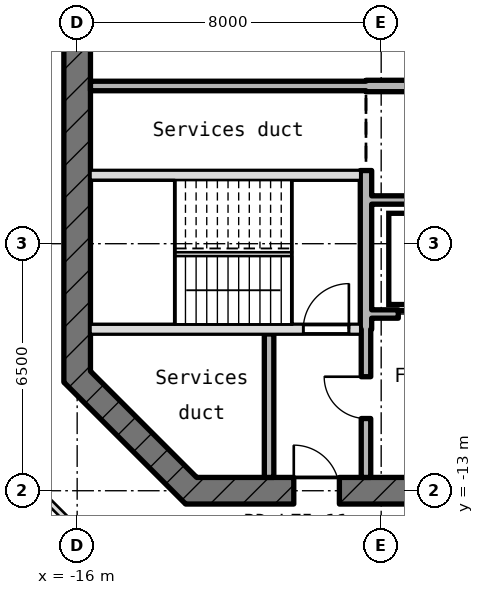
"""IFC4 building model, lengths in metres.
Left out: names, types, materials, properties, quantities, classifications, styles, units other than length and angle.
Written with IfcOpenShell. Run it as: python <this file> out.ifc"""

import sys

from ifc_helpers import new_model, si_unit, direction, frame, frame_2d, origin, place, context, subcontext, project, spatial, rectangle, extrude, element, fill, save


model = new_model("IFC4")
c1 = context("Model", 3, precision=1e-05, world=origin(), true_north=direction((0.0, 1.0)))
c2 = subcontext(c1, "Body", "Model", "MODEL_VIEW")
j1 = project(units=[si_unit("LENGTHUNIT", "METRE"), si_unit("PLANEANGLEUNIT", "RADIAN")], contexts=[c1])
p1 = place(None, origin())
s1 = spatial("IfcSite", under=j1, at=p1, CompositionType="ELEMENT")
p2 = place(p1, origin())
s2 = spatial("IfcBuilding", under=s1, at=p2, CompositionType="ELEMENT")
p3 = place(p2, frame((0.0, 0.0, 334.3)))
s3 = spatial("IfcBuildingStorey", under=s2, at=p3, CompositionType="ELEMENT", Elevation=334.3)
p4 = place(p3, frame((-16.0, 10.145, -0.18), z_axis=(0.0, 0.0, 1.0), x_axis=(0.0, -1.0, 0.0)))
e1 = element("IfcWall", 1, at=p4, inside=s3, PredefinedType="SHEAR", context=c2, shape_type="SweptSolid", body=[
    extrude(rectangle(XDim=20.29, YDim=0.7, at=frame_2d((10.145, 0.0))), origin(), (0.0, 0.0, 1.0), 4.15),
])
p5 = place(p4, frame((8.945, 0.0, 0.18)))
e2 = element("IfcOpeningElement", 2, at=p5, cuts=e1, PredefinedType="OPENING", context=c2, shape_type="SweptSolid", body=[
    extrude(rectangle(XDim=2.4, YDim=2.1, at=frame_2d((1.2, 1.05))), frame((0.0, 0.36, 0.0), z_axis=(0.0, -1.0, 0.0), x_axis=(1.0, 0.0, 0.0)), (0.0, 0.0, 1.0), 0.72),
])
p6 = place(p4, frame((5.545, 0.0, 0.18)))
e3 = element("IfcOpeningElement", 3, at=p6, cuts=e1, PredefinedType="OPENING", context=c2, shape_type="SweptSolid", body=[
    extrude(rectangle(XDim=1.2, YDim=2.1, at=frame_2d((0.6, 1.05))), frame((0.0, 0.36, 0.0), z_axis=(0.0, -1.0, 0.0), x_axis=(1.0, 0.0, 0.0)), (0.0, 0.0, 1.0), 0.72),
])
p7 = place(p3, frame((-16.103, -9.897, -0.18), z_axis=(0.0, 0.0, 1.0), x_axis=(0.707106781187, -0.707106781187, 0.0)))
e4 = element("IfcWall", 4, at=p7, inside=s3, PredefinedType="SHEAR", context=c2, shape_type="SweptSolid", body=[
    extrude(rectangle(XDim=4.533, YDim=0.7, at=frame_2d((2.266, 0.0))), origin(), (0.0, 0.0, 1.0), 4.15),
])
p8 = place(p3, frame((-13.145, -13.0, -0.18), z_axis=(0.0, 0.0, 1.0), x_axis=(1.0, 0.0, 0.0)))
e5 = element("IfcWall", 5, at=p8, inside=s3, PredefinedType="SHEAR", context=c2, shape_type="SweptSolid", body=[
    extrude(rectangle(XDim=26.29, YDim=0.7, at=frame_2d((13.145, 0.0))), origin(), (0.0, 0.0, 1.0), 4.15),
])
p9 = place(p8, frame((2.845, 0.0, 0.18)))
e6 = element("IfcOpeningElement", 6, at=p9, cuts=e5, PredefinedType="OPENING", context=c2, shape_type="SweptSolid", body=[
    extrude(rectangle(XDim=1.2, YDim=2.1, at=frame_2d((0.6, 1.05))), frame((0.0, 0.36, 0.0), z_axis=(0.0, -1.0, 0.0), x_axis=(1.0, 0.0, 0.0)), (0.0, 0.0, 1.0), 0.72),
])
p10 = place(p8, frame((6.845, 0.0, 0.18)))
e7 = element("IfcOpeningElement", 7, at=p10, cuts=e5, PredefinedType="OPENING", context=c2, shape_type="SweptSolid", body=[
    extrude(rectangle(XDim=1.4, YDim=2.1, at=frame_2d((0.7, 1.05))), frame((0.0, 0.36, 0.0), z_axis=(0.0, -1.0, 0.0), x_axis=(1.0, 0.0, 0.0)), (0.0, 0.0, 1.0), 0.72),
])
p11 = place(p8, frame((15.445, 0.0, 0.18)))
e8 = element("IfcOpeningElement", 8, at=p11, cuts=e5, PredefinedType="OPENING", context=c2, shape_type="SweptSolid", body=[
    extrude(rectangle(XDim=1.4, YDim=2.1, at=frame_2d((0.7, 1.05))), frame((0.0, 0.36, 0.0), z_axis=(0.0, -1.0, 0.0), x_axis=(1.0, 0.0, 0.0)), (0.0, 0.0, 1.0), 0.72),
])
p12 = place(p3, frame((-15.65, -8.75, -0.18), z_axis=(0.0, 0.0, 1.0), x_axis=(1.0, 0.0, 0.0)))
e9 = element("IfcWall", 9, at=p12, inside=s3, PredefinedType="SHEAR", context=c2, shape_type="SweptSolid", body=[
    extrude(rectangle(XDim=7.1, YDim=0.25, at=frame_2d((3.55, 0.0))), origin(), (0.0, 0.0, 1.0), 4.15),
])
p13 = place(p12, frame((5.6, 0.0, 0.18)))
e10 = element("IfcOpeningElement", 10, at=p13, cuts=e9, PredefinedType="OPENING", context=c2, shape_type="SweptSolid", body=[
    extrude(rectangle(XDim=1.2, YDim=2.1, at=frame_2d((0.6, 1.05))), frame((0.0, 0.135, 0.0), z_axis=(0.0, -1.0, 0.0), x_axis=(1.0, 0.0, 0.0)), (0.0, 0.0, 1.0), 0.27),
])
p14 = place(p3, frame((-8.25, -8.35, 0.0), z_axis=(0.0, 0.0, 1.0), x_axis=(1.0, 0.0, 0.0)))
e11 = element("IfcWall", 11, at=p14, inside=s3, PredefinedType="STANDARD", context=c2, shape_type="SweptSolid", body=[
    extrude(rectangle(XDim=5.34, YDim=0.22, at=frame_2d((2.67, 0.0))), origin(), (0.0, 0.0, 1.0), 3.97),
])
p15 = place(p14, frame((0.7, 0.0, 0.0)))
e12 = element("IfcOpeningElement", 12, at=p15, cuts=e11, PredefinedType="OPENING", context=c2, shape_type="SweptSolid", body=[
    extrude(rectangle(XDim=1.1, YDim=2.1, at=frame_2d((0.55, 1.05))), frame((0.0, 0.12, 0.0), z_axis=(0.0, -1.0, 0.0), x_axis=(1.0, 0.0, 0.0)), (0.0, 0.0, 1.0), 0.24),
])
p16 = place(p14, frame((3.5, 0.0, 0.0)))
e13 = element("IfcOpeningElement", 13, at=p16, cuts=e11, PredefinedType="OPENING", context=c2, shape_type="SweptSolid", body=[
    extrude(rectangle(XDim=1.1, YDim=2.1, at=frame_2d((0.55, 1.05))), frame((0.0, 0.12, 0.0), z_axis=(0.0, -1.0, 0.0), x_axis=(1.0, 0.0, 0.0)), (0.0, 0.0, 1.0), 0.24),
])
p17 = place(p3, frame((-8.25, -5.35, 0.0), z_axis=(0.0, 0.0, 1.0), x_axis=(1.0, 0.0, 0.0)))
e14 = element("IfcWall", 14, at=p17, inside=s3, PredefinedType="STANDARD", context=c2, shape_type="SweptSolid", body=[
    extrude(rectangle(XDim=16.5, YDim=0.22, at=frame_2d((8.25, 0.0))), origin(), (0.0, 0.0, 1.0), 3.97),
])
p18 = place(p3, frame((-15.65, -4.7, -0.18), z_axis=(0.0, 0.0, 1.0), x_axis=(1.0, 0.0, 0.0)))
e15 = element("IfcWall", 15, at=p18, inside=s3, PredefinedType="SHEAR", context=c2, shape_type="SweptSolid", body=[
    extrude(rectangle(XDim=7.1, YDim=0.25, at=frame_2d((3.55, 0.0))), origin(), (0.0, 0.0, 1.0), 4.15),
])
p19 = place(p3, frame((-15.65, -2.35, 0.0), z_axis=(0.0, 0.0, 1.0), x_axis=(1.0, 0.0, 0.0)))
e16 = element("IfcWall", 16, at=p19, inside=s3, PredefinedType="STANDARD", context=c2, shape_type="SweptSolid", body=[
    extrude(rectangle(XDim=7.25, YDim=0.25, at=frame_2d((3.625, 0.0))), origin(), (0.0, 0.0, 1.0), 3.97),
])
p20 = place(p3, frame((-8.4, -2.35, -0.18), z_axis=(0.0, 0.0, 1.0), x_axis=(1.0, 0.0, 0.0)))
e17 = element("IfcWall", 17, at=p20, inside=s3, PredefinedType="SHEAR", context=c2, shape_type="SweptSolid", body=[
    extrude(rectangle(XDim=16.8, YDim=0.3, at=frame_2d((8.4, 0.0))), origin(), (0.0, 0.0, 1.0), 4.15),
])
p21 = place(p20, frame((2.2, 0.0, 0.18)))
e18 = element("IfcOpeningElement", 18, at=p21, cuts=e17, PredefinedType="OPENING", context=c2, shape_type="SweptSolid", body=[
    extrude(rectangle(XDim=1.2, YDim=2.1, at=frame_2d((0.6, 1.05))), frame((0.0, 0.16, 0.0), z_axis=(0.0, -1.0, 0.0), x_axis=(1.0, 0.0, 0.0)), (0.0, 0.0, 1.0), 0.32),
])
p22 = place(p20, frame((5.0, 0.0, 0.18)))
e19 = element("IfcOpeningElement", 19, at=p22, cuts=e17, PredefinedType="OPENING", context=c2, shape_type="SweptSolid", body=[
    extrude(rectangle(XDim=1.2, YDim=2.1, at=frame_2d((0.6, 1.05))), frame((0.0, 0.16, 0.0), z_axis=(0.0, -1.0, 0.0), x_axis=(1.0, 0.0, 0.0)), (0.0, 0.0, 1.0), 0.32),
])
p23 = place(p20, frame((7.8, 0.0, 0.18)))
e20 = element("IfcOpeningElement", 20, at=p23, cuts=e17, PredefinedType="OPENING", context=c2, shape_type="SweptSolid", body=[
    extrude(rectangle(XDim=1.2, YDim=2.1, at=frame_2d((0.6, 1.05))), frame((0.0, 0.16, 0.0), z_axis=(0.0, -1.0, 0.0), x_axis=(1.0, 0.0, 0.0)), (0.0, 0.0, 1.0), 0.32),
])
p24 = place(p20, frame((10.6, 0.0, 0.18)))
e21 = element("IfcOpeningElement", 21, at=p24, cuts=e17, PredefinedType="OPENING", context=c2, shape_type="SweptSolid", body=[
    extrude(rectangle(XDim=1.2, YDim=2.1, at=frame_2d((0.6, 1.05))), frame((0.0, 0.16, 0.0), z_axis=(0.0, -1.0, 0.0), x_axis=(1.0, 0.0, 0.0)), (0.0, 0.0, 1.0), 0.32),
])
p25 = place(p20, frame((13.4, 0.0, 0.18)))
e22 = element("IfcOpeningElement", 22, at=p25, cuts=e17, PredefinedType="OPENING", context=c2, shape_type="SweptSolid", body=[
    extrude(rectangle(XDim=1.2, YDim=2.1, at=frame_2d((0.6, 1.05))), frame((0.0, 0.16, 0.0), z_axis=(0.0, -1.0, 0.0), x_axis=(1.0, 0.0, 0.0)), (0.0, 0.0, 1.0), 0.32),
])
p26 = place(p3, frame((-10.95, -12.65, 0.0), z_axis=(0.0, 0.0, 1.0), x_axis=(0.0, 1.0, 0.0)))
e23 = element("IfcWall", 23, at=p26, inside=s3, PredefinedType="STANDARD", context=c2, shape_type="SweptSolid", body=[
    extrude(rectangle(XDim=3.775, YDim=0.25, at=frame_2d((1.887, 0.0))), origin(), (0.0, 0.0, 1.0), 3.97),
])
p27 = place(p3, frame((-8.4, -12.65, 0.0), z_axis=(0.0, 0.0, 1.0), x_axis=(0.0, 1.0, 0.0)))
e24 = element("IfcWall", 24, at=p27, inside=s3, PredefinedType="STANDARD", context=c2, shape_type="SweptSolid", body=[
    extrude(rectangle(XDim=3.9, YDim=0.25, at=frame_2d((1.95, 0.0))), origin(), (0.0, 0.0, 1.0), 3.97),
])
p28 = place(p27, frame((1.55, 0.0, 0.0)))
e25 = element("IfcOpeningElement", 25, at=p28, cuts=e24, PredefinedType="OPENING", context=c2, shape_type="SweptSolid", body=[
    extrude(rectangle(XDim=1.1, YDim=2.1, at=frame_2d((0.55, 1.05))), frame((0.0, 0.135, 0.0), z_axis=(0.0, -1.0, 0.0), x_axis=(1.0, 0.0, 0.0)), (0.0, 0.0, 1.0), 0.27),
])
p29 = place(p3, frame((-8.4, -8.75, -0.18), z_axis=(0.0, 0.0, 1.0), x_axis=(0.0, 1.0, 0.0)))
e26 = element("IfcWall", 26, at=p29, inside=s3, PredefinedType="SHEAR", context=c2, shape_type="SweptSolid", body=[
    extrude(rectangle(XDim=4.175, YDim=0.3, at=frame_2d((2.087, 0.0))), origin(), (0.0, 0.0, 1.0), 4.15),
])
p30 = place(p3, frame((-14.18, -15.85, 0.0), z_axis=(0.0, 0.0, 1.0), x_axis=(-0.707106781187, 0.707106781187, 0.0)))
e27 = element("IfcWall", 27, at=p30, inside=s3, PredefinedType="PARTITIONING", context=c2, shape_type="SweptSolid", body=[
    extrude(rectangle(XDim=6.604, YDim=0.15, at=frame_2d((3.302, 0.0))), origin(), (0.0, 0.0, 1.0), 3.97),
])
p31 = place(p15, origin())
e28 = element("IfcDoor", 28, at=p31, inside=s3, OperationType="DOUBLE_DOOR_SLIDING", PredefinedType="DOOR", context=c2, shape_type="SweptSolid", body=[
    extrude(rectangle(XDim=1.1, YDim=2.1, at=frame_2d((0.55, 1.05))), frame((0.0, 0.025, 0.0), z_axis=(0.0, -1.0, 0.0), x_axis=(1.0, 0.0, 0.0)), (0.0, 0.0, 1.0), 0.05),
])
fill(e12, e28)
p32 = place(p13, origin())
e29 = element("IfcDoor", 29, at=p32, inside=s3, OperationType="SINGLE_SWING_RIGHT", PredefinedType="DOOR", context=c2, shape_type="SweptSolid", body=[
    extrude(rectangle(XDim=1.2, YDim=2.1, at=frame_2d((0.6, 1.05))), frame((0.0, 0.025, 0.0), z_axis=(0.0, -1.0, 0.0), x_axis=(1.0, 0.0, 0.0)), (0.0, 0.0, 1.0), 0.05),
])
fill(e10, e29)
p33 = place(p28, origin())
e30 = element("IfcDoor", 30, at=p33, inside=s3, OperationType="SINGLE_SWING_RIGHT", PredefinedType="DOOR", context=c2, shape_type="SweptSolid", body=[
    extrude(rectangle(XDim=1.1, YDim=2.1, at=frame_2d((0.55, 1.05))), frame((0.0, 0.025, 0.0), z_axis=(0.0, -1.0, 0.0), x_axis=(1.0, 0.0, 0.0)), (0.0, 0.0, 1.0), 0.05),
])
fill(e25, e30)
p34 = place(p9, origin())
e31 = element("IfcDoor", 31, at=p34, inside=s3, OperationType="SINGLE_SWING_RIGHT", PredefinedType="DOOR", context=c2, shape_type="SweptSolid", body=[
    extrude(rectangle(XDim=1.2, YDim=2.1, at=frame_2d((0.6, 1.05))), frame((0.0, 0.025, 0.0), z_axis=(0.0, -1.0, 0.0), x_axis=(1.0, 0.0, 0.0)), (0.0, 0.0, 1.0), 0.05),
])
fill(e6, e31)
save(model, sys.argv[1])
